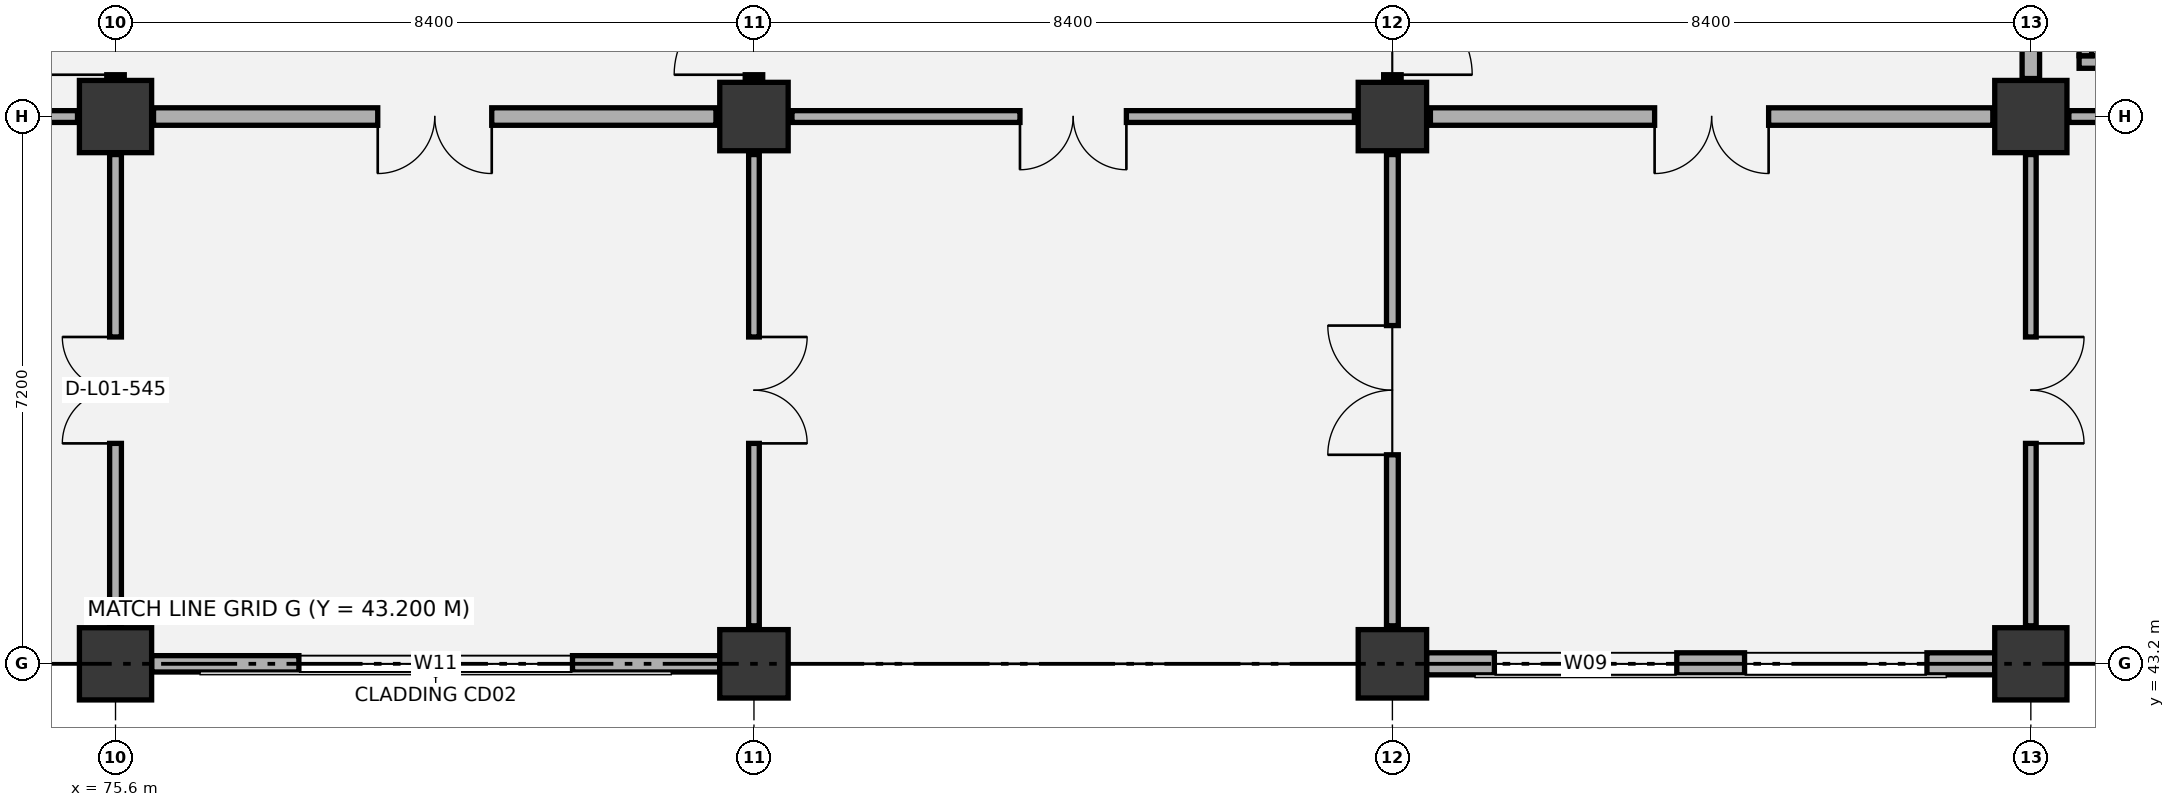
"""IFC4 building model, lengths in metres.
Left out: names, types, materials, properties, quantities, classifications, styles, units other than length and angle.
Written with IfcOpenShell. Run it as: python <this file> out.ifc"""

import sys

from ifc_helpers import new_model, si_unit, direction, frame, frame_2d, origin, origin_2d, place, context, subcontext, project, spatial, rectangle, extrude, element, fill, save


model = new_model("IFC4")
c1 = context("Model", 3, precision=1e-05, world=origin(), true_north=direction((0.0, 1.0)))
c2 = subcontext(c1, "Body", "Model", "MODEL_VIEW")
j1 = project(units=[si_unit("LENGTHUNIT", "METRE"), si_unit("PLANEANGLEUNIT", "RADIAN")], contexts=[c1])
p1 = place(None, origin())
s1 = spatial("IfcSite", under=j1, at=p1, CompositionType="ELEMENT")
p2 = place(p1, origin())
s2 = spatial("IfcBuilding", under=s1, at=p2, CompositionType="ELEMENT")
p3 = place(p2, frame((0.0, 0.0, 6.0)))
s3 = spatial("IfcBuildingStorey", under=s2, at=p3, CompositionType="ELEMENT", Elevation=6.0)
for number, where, z_axis, x_axis in (
    (1, (75.6, 43.2, 0.0), (0.0, 0.0, 1.0), (1.0, 0.0, 0.0)),
    (2, (75.6, 50.4, 0.0), (0.0, 0.0, 1.0), (1.0, 0.0, 0.0)),
):
    element("IfcColumn", number, at=place(p3, frame(where, z_axis=z_axis, x_axis=x_axis)), inside=s3, PredefinedType="COLUMN", context=c2, shape_type="SweptSolid", body=[
        extrude(rectangle(XDim=0.95, YDim=0.95, at=origin_2d()), origin(), (0.0, 0.0, 1.0), 5.4),
    ])
for number, where, z_axis, x_axis in (
    (3, (84.0, 43.2, 0.0), (0.0, 0.0, 1.0), (1.0, 0.0, 0.0)),
    (4, (84.0, 50.4, 0.0), (0.0, 0.0, 1.0), (1.0, 0.0, 0.0)),
    (5, (92.4, 43.2, 0.0), (0.0, 0.0, 1.0), (1.0, 0.0, 0.0)),
    (6, (92.4, 50.4, 0.0), (0.0, 0.0, 1.0), (1.0, 0.0, 0.0)),
):
    element("IfcColumn", number, at=place(p3, frame(where, z_axis=z_axis, x_axis=x_axis)), inside=s3, PredefinedType="COLUMN", context=c2, shape_type="SweptSolid", body=[
        extrude(rectangle(XDim=0.9, YDim=0.9, at=origin_2d()), origin(), (0.0, 0.0, 1.0), 5.4),
    ])
for number, where, z_axis, x_axis in (
    (7, (100.8, 43.2, 0.0), (0.0, 0.0, 1.0), (1.0, 0.0, 0.0)),
    (8, (100.8, 50.4, 0.0), (0.0, 0.0, 1.0), (1.0, 0.0, 0.0)),
):
    element("IfcColumn", number, at=place(p3, frame(where, z_axis=z_axis, x_axis=x_axis)), inside=s3, PredefinedType="COLUMN", context=c2, shape_type="SweptSolid", body=[
        extrude(rectangle(XDim=0.95, YDim=0.95, at=origin_2d()), origin(), (0.0, 0.0, 1.0), 5.4),
    ])
p4 = place(p3, frame((76.075, 43.2, 0.0), z_axis=(0.0, 0.0, 1.0), x_axis=(1.0, 0.0, 0.0)))
e9 = element("IfcWall", 9, at=p4, inside=s3, PredefinedType="SOLIDWALL", context=c2, shape_type="SweptSolid", body=[
    extrude(rectangle(XDim=7.475, YDim=0.215, at=frame_2d((3.738, 0.0))), origin(), (0.0, 0.0, 1.0), 4.42),
])
p5 = place(p4, frame((1.938, 0.0, 0.9)))
e10 = element("IfcOpeningElement", 10, at=p5, cuts=e9, PredefinedType="OPENING", context=c2, shape_type="SweptSolid", body=[
    extrude(rectangle(XDim=3.6, YDim=2.4, at=frame_2d((1.8, 1.2))), frame((0.0, 0.117, 0.0), z_axis=(0.0, -1.0, 0.0), x_axis=(1.0, 0.0, 0.0)), (0.0, 0.0, 1.0), 0.235),
])
p6 = place(p3, frame((92.85, 43.2, 0.0), z_axis=(0.0, 0.0, 1.0), x_axis=(1.0, 0.0, 0.0)))
e11 = element("IfcWall", 11, at=p6, inside=s3, PredefinedType="SOLIDWALL", context=c2, shape_type="SweptSolid", body=[
    extrude(rectangle(XDim=7.475, YDim=0.29, at=frame_2d((3.737, 0.0))), origin(), (0.0, 0.0, 1.0), 4.42),
])
p7 = place(p6, frame((0.892, 0.0, 0.9)))
e12 = element("IfcOpeningElement", 12, at=p7, cuts=e11, PredefinedType="OPENING", context=c2, shape_type="SweptSolid", body=[
    extrude(rectangle(XDim=2.4, YDim=2.1, at=frame_2d((1.2, 1.05))), frame((0.0, 0.155, 0.0), z_axis=(0.0, -1.0, 0.0), x_axis=(1.0, 0.0, 0.0)), (0.0, 0.0, 1.0), 0.31),
])
p8 = place(p6, frame((4.183, 0.0, 0.9)))
e13 = element("IfcOpeningElement", 13, at=p8, cuts=e11, PredefinedType="OPENING", context=c2, shape_type="SweptSolid", body=[
    extrude(rectangle(XDim=2.4, YDim=2.1, at=frame_2d((1.2, 1.05))), frame((0.0, 0.155, 0.0), z_axis=(0.0, -1.0, 0.0), x_axis=(1.0, 0.0, 0.0)), (0.0, 0.0, 1.0), 0.31),
])
p9 = place(p3, frame((101.435, 51.117, 0.0), z_axis=(0.0, 0.0, 1.0), x_axis=(1.0, 0.0, 0.0)))
e14 = element("IfcWall", 14, at=p9, inside=s3, PredefinedType="PARTITIONING", context=c2, shape_type="SweptSolid", body=[
    extrude(rectangle(XDim=1.43, YDim=0.165, at=frame_2d((0.715, 0.0))), origin(), (0.0, 0.0, 1.0), 5.075),
])
p10 = place(p3, frame((101.518, 51.2, 0.0), z_axis=(0.0, 0.0, 1.0), x_axis=(0.0, 1.0, 0.0)))
e15 = element("IfcWall", 15, at=p10, inside=s3, PredefinedType="PARTITIONING", context=c2, shape_type="SweptSolid", body=[
    extrude(rectangle(XDim=0.8, YDim=0.165, at=frame_2d((0.4, 0.0))), origin(), (0.0, 0.0, 1.0), 5.075),
])
p11 = place(p3, frame((75.6, 43.7, 0.0), z_axis=(0.0, 0.0, 1.0), x_axis=(0.0, 1.0, 0.0)))
e16 = element("IfcWall", 16, at=p11, inside=s3, PredefinedType="PARTITIONING", context=c2, shape_type="SweptSolid", body=[
    extrude(rectangle(XDim=6.2, YDim=0.155, at=frame_2d((3.1, 0.0))), origin(), (0.0, 0.0, 1.0), 4.57),
])
p12 = place(p11, frame((2.4, 0.0, 0.0)))
e17 = element("IfcOpeningElement", 17, at=p12, cuts=e16, PredefinedType="OPENING", context=c2, shape_type="SweptSolid", body=[
    extrude(rectangle(XDim=1.4, YDim=2.15, at=frame_2d((0.7, 1.075))), frame((0.0, 0.087, 0.0), z_axis=(0.0, -1.0, 0.0), x_axis=(1.0, 0.0, 0.0)), (0.0, 0.0, 1.0), 0.175),
])
p13 = place(p3, frame((67.7, 50.4, 0.0), z_axis=(0.0, 0.0, 1.0), x_axis=(1.0, 0.0, 0.0)))
e18 = element("IfcWall", 18, at=p13, inside=s3, PredefinedType="PARTITIONING", context=c2, shape_type="SweptSolid", body=[
    extrude(rectangle(XDim=7.4, YDim=0.155, at=frame_2d((3.7, 0.0))), origin(), (0.0, 0.0, 1.0), 4.27),
])
p14 = place(p13, frame((2.85, 0.0, 0.0)))
e19 = element("IfcOpeningElement", 19, at=p14, cuts=e18, PredefinedType="OPENING", context=c2, shape_type="SweptSolid", body=[
    extrude(rectangle(XDim=1.7, YDim=2.25, at=frame_2d((0.85, 1.125))), frame((0.0, 0.087, 0.0), z_axis=(0.0, -1.0, 0.0), x_axis=(1.0, 0.0, 0.0)), (0.0, 0.0, 1.0), 0.175),
])
p15 = place(p3, frame((75.6, 50.9, 0.0), z_axis=(0.0, 0.0, 1.0), x_axis=(0.0, 1.0, 0.0)))
e20 = element("IfcWall", 20, at=p15, inside=s3, PredefinedType="PARTITIONING", context=c2, shape_type="SweptSolid", body=[
    extrude(rectangle(XDim=6.2, YDim=0.23, at=frame_2d((3.1, 0.0))), origin(), (0.0, 0.0, 1.0), 4.32),
])
p16 = place(p15, frame((0.05, 0.0, 0.0)))
e21 = element("IfcOpeningElement", 21, at=p16, cuts=e20, PredefinedType="OPENING", context=c2, shape_type="SweptSolid", body=[
    extrude(rectangle(XDim=1.05, YDim=2.15, at=frame_2d((0.525, 1.075))), frame((0.0, 0.125, 0.0), z_axis=(0.0, -1.0, 0.0), x_axis=(1.0, 0.0, 0.0)), (0.0, 0.0, 1.0), 0.25),
])
p17 = place(p3, frame((84.0, 43.7, 0.0), z_axis=(0.0, 0.0, 1.0), x_axis=(0.0, 1.0, 0.0)))
e22 = element("IfcWall", 22, at=p17, inside=s3, PredefinedType="PARTITIONING", context=c2, shape_type="SweptSolid", body=[
    extrude(rectangle(XDim=6.2, YDim=0.14, at=frame_2d((3.1, 0.0))), origin(), (0.0, 0.0, 1.0), 4.32),
])
p18 = place(p17, frame((2.4, 0.0, 0.0)))
e23 = element("IfcOpeningElement", 23, at=p18, cuts=e22, PredefinedType="OPENING", context=c2, shape_type="SweptSolid", body=[
    extrude(rectangle(XDim=1.4, YDim=2.15, at=frame_2d((0.7, 1.075))), frame((0.0, 0.08, 0.0), z_axis=(0.0, -1.0, 0.0), x_axis=(1.0, 0.0, 0.0)), (0.0, 0.0, 1.0), 0.16),
])
p19 = place(p3, frame((76.1, 50.4, 0.0), z_axis=(0.0, 0.0, 1.0), x_axis=(1.0, 0.0, 0.0)))
e24 = element("IfcWall", 24, at=p19, inside=s3, PredefinedType="PARTITIONING", context=c2, shape_type="SweptSolid", body=[
    extrude(rectangle(XDim=7.4, YDim=0.23, at=frame_2d((3.7, 0.0))), origin(), (0.0, 0.0, 1.0), 4.27),
])
p20 = place(p19, frame((2.95, 0.0, 0.0)))
e25 = element("IfcOpeningElement", 25, at=p20, cuts=e24, PredefinedType="OPENING", context=c2, shape_type="SweptSolid", body=[
    extrude(rectangle(XDim=1.5, YDim=2.15, at=frame_2d((0.75, 1.075))), frame((0.0, 0.125, 0.0), z_axis=(0.0, -1.0, 0.0), x_axis=(1.0, 0.0, 0.0)), (0.0, 0.0, 1.0), 0.25),
])
p21 = place(p3, frame((84.0, 50.9, 0.0), z_axis=(0.0, 0.0, 1.0), x_axis=(0.0, 1.0, 0.0)))
e26 = element("IfcWall", 26, at=p21, inside=s3, PredefinedType="PARTITIONING", context=c2, shape_type="SweptSolid", body=[
    extrude(rectangle(XDim=6.2, YDim=0.23, at=frame_2d((3.1, 0.0))), origin(), (0.0, 0.0, 1.0), 4.67),
])
p22 = place(p21, frame((0.05, 0.0, 0.0)))
e27 = element("IfcOpeningElement", 27, at=p22, cuts=e26, PredefinedType="OPENING", context=c2, shape_type="SweptSolid", body=[
    extrude(rectangle(XDim=1.05, YDim=2.15, at=frame_2d((0.525, 1.075))), frame((0.0, 0.125, 0.0), z_axis=(0.0, -1.0, 0.0), x_axis=(1.0, 0.0, 0.0)), (0.0, 0.0, 1.0), 0.25),
])
p23 = place(p3, frame((92.4, 43.7, 0.0), z_axis=(0.0, 0.0, 1.0), x_axis=(0.0, 1.0, 0.0)))
e28 = element("IfcWall", 28, at=p23, inside=s3, PredefinedType="PARTITIONING", context=c2, shape_type="SweptSolid", body=[
    extrude(rectangle(XDim=6.2, YDim=0.155, at=frame_2d((3.1, 0.0))), origin(), (0.0, 0.0, 1.0), 4.67),
])
p24 = place(p23, frame((2.25, 0.0, 0.0)))
e29 = element("IfcOpeningElement", 29, at=p24, cuts=e28, PredefinedType="OPENING", context=c2, shape_type="SweptSolid", body=[
    extrude(rectangle(XDim=1.7, YDim=2.25, at=frame_2d((0.85, 1.125))), frame((0.0, 0.087, 0.0), z_axis=(0.0, -1.0, 0.0), x_axis=(1.0, 0.0, 0.0)), (0.0, 0.0, 1.0), 0.175),
])
p25 = place(p3, frame((84.5, 50.4, 0.0), z_axis=(0.0, 0.0, 1.0), x_axis=(1.0, 0.0, 0.0)))
e30 = element("IfcWall", 30, at=p25, inside=s3, PredefinedType="PARTITIONING", context=c2, shape_type="SweptSolid", body=[
    extrude(rectangle(XDim=7.4, YDim=0.155, at=frame_2d((3.7, 0.0))), origin(), (0.0, 0.0, 1.0), 4.27),
])
p26 = place(p25, frame((3.0, 0.0, 0.0)))
e31 = element("IfcOpeningElement", 31, at=p26, cuts=e30, PredefinedType="OPENING", context=c2, shape_type="SweptSolid", body=[
    extrude(rectangle(XDim=1.4, YDim=2.15, at=frame_2d((0.7, 1.075))), frame((0.0, 0.087, 0.0), z_axis=(0.0, -1.0, 0.0), x_axis=(1.0, 0.0, 0.0)), (0.0, 0.0, 1.0), 0.175),
])
p27 = place(p3, frame((92.4, 50.9, 0.0), z_axis=(0.0, 0.0, 1.0), x_axis=(0.0, 1.0, 0.0)))
e32 = element("IfcWall", 32, at=p27, inside=s3, PredefinedType="PARTITIONING", context=c2, shape_type="SweptSolid", body=[
    extrude(rectangle(XDim=6.2, YDim=0.23, at=frame_2d((3.1, 0.0))), origin(), (0.0, 0.0, 1.0), 4.32),
])
p28 = place(p27, frame((0.05, 0.0, 0.0)))
e33 = element("IfcOpeningElement", 33, at=p28, cuts=e32, PredefinedType="OPENING", context=c2, shape_type="SweptSolid", body=[
    extrude(rectangle(XDim=1.05, YDim=2.15, at=frame_2d((0.525, 1.075))), frame((0.0, 0.125, 0.0), z_axis=(0.0, -1.0, 0.0), x_axis=(1.0, 0.0, 0.0)), (0.0, 0.0, 1.0), 0.25),
])
p29 = place(p3, frame((100.8, 43.7, 0.0), z_axis=(0.0, 0.0, 1.0), x_axis=(0.0, 1.0, 0.0)))
e34 = element("IfcWall", 34, at=p29, inside=s3, PredefinedType="PARTITIONING", context=c2, shape_type="SweptSolid", body=[
    extrude(rectangle(XDim=6.2, YDim=0.14, at=frame_2d((3.1, 0.0))), origin(), (0.0, 0.0, 1.0), 4.32),
])
p30 = place(p29, frame((2.4, 0.0, 0.0)))
e35 = element("IfcOpeningElement", 35, at=p30, cuts=e34, PredefinedType="OPENING", context=c2, shape_type="SweptSolid", body=[
    extrude(rectangle(XDim=1.4, YDim=2.15, at=frame_2d((0.7, 1.075))), frame((0.0, 0.08, 0.0), z_axis=(0.0, -1.0, 0.0), x_axis=(1.0, 0.0, 0.0)), (0.0, 0.0, 1.0), 0.16),
])
p31 = place(p3, frame((92.9, 50.4, 0.0), z_axis=(0.0, 0.0, 1.0), x_axis=(1.0, 0.0, 0.0)))
e36 = element("IfcWall", 36, at=p31, inside=s3, PredefinedType="PARTITIONING", context=c2, shape_type="SweptSolid", body=[
    extrude(rectangle(XDim=7.4, YDim=0.23, at=frame_2d((3.7, 0.0))), origin(), (0.0, 0.0, 1.0), 4.27),
])
p32 = place(p31, frame((2.95, 0.0, 0.0)))
e37 = element("IfcOpeningElement", 37, at=p32, cuts=e36, PredefinedType="OPENING", context=c2, shape_type="SweptSolid", body=[
    extrude(rectangle(XDim=1.5, YDim=2.15, at=frame_2d((0.75, 1.075))), frame((0.0, 0.125, 0.0), z_axis=(0.0, -1.0, 0.0), x_axis=(1.0, 0.0, 0.0)), (0.0, 0.0, 1.0), 0.25),
])
p33 = place(p3, frame((100.8, 50.9, 0.0), z_axis=(0.0, 0.0, 1.0), x_axis=(0.0, 1.0, 0.0)))
e38 = element("IfcWall", 38, at=p33, inside=s3, PredefinedType="PARTITIONING", context=c2, shape_type="SweptSolid", body=[
    extrude(rectangle(XDim=6.2, YDim=0.23, at=frame_2d((3.1, 0.0))), origin(), (0.0, 0.0, 1.0), 4.78),
])
p34 = place(p3, frame((101.3, 50.4, 0.0), z_axis=(0.0, 0.0, 1.0), x_axis=(1.0, 0.0, 0.0)))
e39 = element("IfcWall", 39, at=p34, inside=s3, PredefinedType="PARTITIONING", context=c2, shape_type="SweptSolid", body=[
    extrude(rectangle(XDim=7.4, YDim=0.155, at=frame_2d((3.7, 0.0))), origin(), (0.0, 0.0, 1.0), 4.27),
])
p35 = place(p34, frame((3.0, 0.0, 0.0)))
e40 = element("IfcOpeningElement", 40, at=p35, cuts=e39, PredefinedType="OPENING", context=c2, shape_type="SweptSolid", body=[
    extrude(rectangle(XDim=1.4, YDim=2.15, at=frame_2d((0.7, 1.075))), frame((0.0, 0.087, 0.0), z_axis=(0.0, -1.0, 0.0), x_axis=(1.0, 0.0, 0.0)), (0.0, 0.0, 1.0), 0.175),
])
p36 = place(p5, origin())
e41 = element("IfcWindow", 41, at=p36, inside=s3, PartitioningType="SINGLE_PANEL", PredefinedType="WINDOW", context=c2, shape_type="SweptSolid", body=[
    extrude(rectangle(XDim=3.6, YDim=2.4, at=frame_2d((1.8, 1.2))), frame((0.0, 0.03, 0.0), z_axis=(0.0, -1.0, 0.0), x_axis=(1.0, 0.0, 0.0)), (0.0, 0.0, 1.0), 0.06),
])
fill(e10, e41)
p37 = place(p7, origin())
e42 = element("IfcWindow", 42, at=p37, inside=s3, PartitioningType="SINGLE_PANEL", PredefinedType="WINDOW", context=c2, shape_type="SweptSolid", body=[
    extrude(rectangle(XDim=2.4, YDim=2.1, at=frame_2d((1.2, 1.05))), frame((0.0, 0.03, 0.0), z_axis=(0.0, -1.0, 0.0), x_axis=(1.0, 0.0, 0.0)), (0.0, 0.0, 1.0), 0.06),
])
fill(e12, e42)
p38 = place(p8, origin())
e43 = element("IfcWindow", 43, at=p38, inside=s3, PartitioningType="SINGLE_PANEL", PredefinedType="WINDOW", context=c2, shape_type="SweptSolid", body=[
    extrude(rectangle(XDim=2.4, YDim=2.1, at=frame_2d((1.2, 1.05))), frame((0.0, 0.03, 0.0), z_axis=(0.0, -1.0, 0.0), x_axis=(1.0, 0.0, 0.0)), (0.0, 0.0, 1.0), 0.06),
])
fill(e13, e43)
p39 = place(p12, origin())
e44 = element("IfcDoor", 44, at=p39, inside=s3, OperationType="DOUBLE_DOOR_SINGLE_SWING", PredefinedType="DOOR", context=c2, shape_type="SweptSolid", body=[
    extrude(rectangle(XDim=1.4, YDim=2.15, at=frame_2d((0.7, 1.075))), frame((0.0, 0.025, 0.0), z_axis=(0.0, -1.0, 0.0), x_axis=(1.0, 0.0, 0.0)), (0.0, 0.0, 1.0), 0.05),
])
fill(e17, e44)
p40 = place(p16, origin())
e45 = element("IfcDoor", 45, at=p40, inside=s3, OperationType="SINGLE_SWING_LEFT", PredefinedType="DOOR", context=c2, shape_type="SweptSolid", body=[
    extrude(rectangle(XDim=1.05, YDim=2.15, at=frame_2d((0.525, 1.075))), frame((0.0, 0.025, 0.0), z_axis=(0.0, -1.0, 0.0), x_axis=(1.0, 0.0, 0.0)), (0.0, 0.0, 1.0), 0.05),
])
fill(e21, e45)
p41 = place(p18, frame((1.4, 0.0, 0.0), z_axis=(0.0, 0.0, 1.0), x_axis=(-1.0, 0.0, 0.0)))
e46 = element("IfcDoor", 46, at=p41, inside=s3, OperationType="DOUBLE_DOOR_SINGLE_SWING", PredefinedType="DOOR", context=c2, shape_type="SweptSolid", body=[
    extrude(rectangle(XDim=1.4, YDim=2.15, at=frame_2d((0.7, 1.075))), frame((0.0, 0.025, 0.0), z_axis=(0.0, -1.0, 0.0), x_axis=(1.0, 0.0, 0.0)), (0.0, 0.0, 1.0), 0.05),
])
fill(e23, e46)
p42 = place(p20, frame((1.5, 0.0, 0.0), z_axis=(0.0, 0.0, 1.0), x_axis=(-1.0, 0.0, 0.0)))
e47 = element("IfcDoor", 47, at=p42, inside=s3, OperationType="DOUBLE_DOOR_SINGLE_SWING", PredefinedType="DOOR", context=c2, shape_type="SweptSolid", body=[
    extrude(rectangle(XDim=1.5, YDim=2.15, at=frame_2d((0.75, 1.075))), frame((0.0, 0.025, 0.0), z_axis=(0.0, -1.0, 0.0), x_axis=(1.0, 0.0, 0.0)), (0.0, 0.0, 1.0), 0.05),
])
fill(e25, e47)
p43 = place(p22, origin())
e48 = element("IfcDoor", 48, at=p43, inside=s3, OperationType="SINGLE_SWING_LEFT", PredefinedType="DOOR", context=c2, shape_type="SweptSolid", body=[
    extrude(rectangle(XDim=1.05, YDim=2.15, at=frame_2d((0.525, 1.075))), frame((0.0, 0.025, 0.0), z_axis=(0.0, -1.0, 0.0), x_axis=(1.0, 0.0, 0.0)), (0.0, 0.0, 1.0), 0.05),
])
fill(e27, e48)
p44 = place(p24, origin())
e49 = element("IfcDoor", 49, at=p44, inside=s3, OperationType="DOUBLE_DOOR_SINGLE_SWING", PredefinedType="DOOR", context=c2, shape_type="SweptSolid", body=[
    extrude(rectangle(XDim=1.7, YDim=2.25, at=frame_2d((0.85, 1.125))), frame((0.0, 0.025, 0.0), z_axis=(0.0, -1.0, 0.0), x_axis=(1.0, 0.0, 0.0)), (0.0, 0.0, 1.0), 0.05),
])
fill(e29, e49)
p45 = place(p26, frame((1.4, 0.0, 0.0), z_axis=(0.0, 0.0, 1.0), x_axis=(-1.0, 0.0, 0.0)))
e50 = element("IfcDoor", 50, at=p45, inside=s3, OperationType="DOUBLE_DOOR_SINGLE_SWING", PredefinedType="DOOR", context=c2, shape_type="SweptSolid", body=[
    extrude(rectangle(XDim=1.4, YDim=2.15, at=frame_2d((0.7, 1.075))), frame((0.0, 0.025, 0.0), z_axis=(0.0, -1.0, 0.0), x_axis=(1.0, 0.0, 0.0)), (0.0, 0.0, 1.0), 0.05),
])
fill(e31, e50)
p46 = place(p28, frame((1.05, 0.0, 0.0), z_axis=(0.0, 0.0, 1.0), x_axis=(-1.0, 0.0, 0.0)))
e51 = element("IfcDoor", 51, at=p46, inside=s3, OperationType="SINGLE_SWING_RIGHT", PredefinedType="DOOR", context=c2, shape_type="SweptSolid", body=[
    extrude(rectangle(XDim=1.05, YDim=2.15, at=frame_2d((0.525, 1.075))), frame((0.0, 0.025, 0.0), z_axis=(0.0, -1.0, 0.0), x_axis=(1.0, 0.0, 0.0)), (0.0, 0.0, 1.0), 0.05),
])
fill(e33, e51)
p47 = place(p30, frame((1.4, 0.0, 0.0), z_axis=(0.0, 0.0, 1.0), x_axis=(-1.0, 0.0, 0.0)))
e52 = element("IfcDoor", 52, at=p47, inside=s3, OperationType="DOUBLE_DOOR_SINGLE_SWING", PredefinedType="DOOR", context=c2, shape_type="SweptSolid", body=[
    extrude(rectangle(XDim=1.4, YDim=2.15, at=frame_2d((0.7, 1.075))), frame((0.0, 0.025, 0.0), z_axis=(0.0, -1.0, 0.0), x_axis=(1.0, 0.0, 0.0)), (0.0, 0.0, 1.0), 0.05),
])
fill(e35, e52)
p48 = place(p32, frame((1.5, 0.0, 0.0), z_axis=(0.0, 0.0, 1.0), x_axis=(-1.0, 0.0, 0.0)))
e53 = element("IfcDoor", 53, at=p48, inside=s3, OperationType="DOUBLE_DOOR_SINGLE_SWING", PredefinedType="DOOR", context=c2, shape_type="SweptSolid", body=[
    extrude(rectangle(XDim=1.5, YDim=2.15, at=frame_2d((0.75, 1.075))), frame((0.0, 0.025, 0.0), z_axis=(0.0, -1.0, 0.0), x_axis=(1.0, 0.0, 0.0)), (0.0, 0.0, 1.0), 0.05),
])
fill(e37, e53)
save(model, sys.argv[1])
